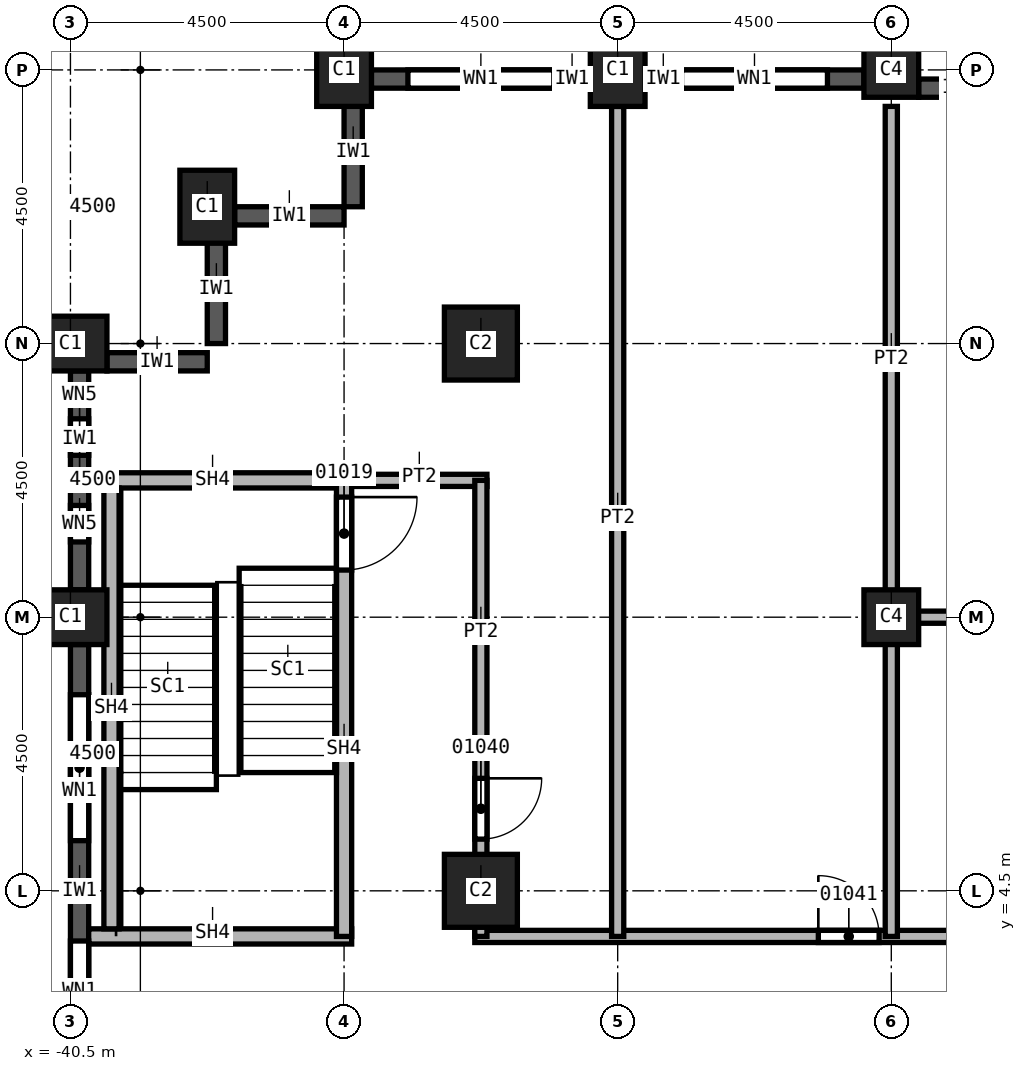
"""IFC4 building model, lengths in metres.
Left out: names, types, materials, properties, quantities, classifications, styles, units other than length and angle.
Written with IfcOpenShell. Run it as: python <this file> out.ifc"""

import sys

from ifc_helpers import new_model, si_unit, direction, frame, frame_2d, origin, origin_2d, place, context, subcontext, project, spatial, rectangle, extrude, element, fill, save


model = new_model("IFC4")
c1 = context("Model", 3, precision=1e-05, world=origin(), true_north=direction((0.0, 1.0)))
c2 = subcontext(c1, "Body", "Model", "MODEL_VIEW")
j1 = project(units=[si_unit("LENGTHUNIT", "METRE"), si_unit("PLANEANGLEUNIT", "RADIAN")], contexts=[c1])
p1 = place(None, origin())
s1 = spatial("IfcSite", under=j1, at=p1, CompositionType="ELEMENT")
p2 = place(p1, origin())
s2 = spatial("IfcBuilding", under=s1, at=p2, CompositionType="ELEMENT")
p3 = place(p2, frame((0.0, 0.0, 68.0)))
s3 = spatial("IfcBuildingStorey", under=s2, at=p3, CompositionType="ELEMENT", Elevation=68.0)
for number, where, z_axis, x_axis in (
    (1, (-40.5, 9.0, 0.0), (0.0, 0.0, 1.0), (0.0, 1.0, 0.0)),
    (2, (-40.5, 13.5, 0.0), (0.0, 0.0, 1.0), (0.0, 1.0, 0.0)),
    (3, (-38.25, 15.75, 0.0), (0.0, 0.0, 1.0), (1.0, 0.0, 0.0)),
    (4, (-31.5, 18.0, 0.0), (0.0, 0.0, 1.0), (1.0, 0.0, 0.0)),
    (5, (-36.0, 18.0, 0.0), (0.0, 0.0, 1.0), (1.0, 0.0, 0.0)),
):
    element("IfcColumn", number, at=place(p3, frame(where, z_axis=z_axis, x_axis=x_axis)), inside=s3, PredefinedType="COLUMN", context=c2, shape_type="SweptSolid", body=[
        extrude(rectangle(XDim=0.9, YDim=1.2, at=origin_2d()), origin(), (0.0, 0.0, 1.0), 3.7),
    ])
for number, where, z_axis, x_axis in (
    (6, (-33.75, 4.5, 0.0), (0.0, 0.0, 1.0), (1.0, 0.0, 0.0)),
    (7, (-33.75, 13.5, 0.0), (0.0, 0.0, 1.0), (1.0, 0.0, 0.0)),
):
    element("IfcColumn", number, at=place(p3, frame(where, z_axis=z_axis, x_axis=x_axis)), inside=s3, PredefinedType="COLUMN", context=c2, shape_type="SweptSolid", body=[
        extrude(rectangle(XDim=1.2, YDim=1.2, at=origin_2d()), origin(), (0.0, 0.0, 1.0), 3.7),
    ])
for number, where, z_axis, x_axis in (
    (8, (-27.0, 9.0, 0.0), (0.0, 0.0, 1.0), (1.0, 0.0, 0.0)),
    (9, (-27.0, 18.0, 0.0), (0.0, 0.0, 1.0), (1.0, 0.0, 0.0)),
):
    element("IfcColumn", number, at=place(p3, frame(where, z_axis=z_axis, x_axis=x_axis)), inside=s3, PredefinedType="COLUMN", context=c2, shape_type="SweptSolid", body=[
        extrude(rectangle(XDim=0.9, YDim=0.9, at=origin_2d()), origin(), (0.0, 0.0, 1.0), 3.7),
    ])
for number, where, z_axis, x_axis in (
    (10, (-35.85, 17.55, 0.0), (0.0, 0.0, 1.0), (0.0, -1.0, 0.0)),
    (11, (-37.8, 15.6, 0.0), (0.0, 0.0, 1.0), (1.0, 0.0, 0.0)),
    (12, (-38.1, 15.3, 0.0), (0.0, 0.0, 1.0), (0.0, -1.0, 0.0)),
):
    element("IfcWall", number, at=place(p3, frame(where, z_axis=z_axis, x_axis=x_axis)), inside=s3, PredefinedType="SOLIDWALL", context=c2, shape_type="SweptSolid", body=[
        extrude(rectangle(XDim=1.8, YDim=0.3, at=frame_2d((0.9, 0.0))), origin(), (0.0, 0.0, 1.0), 3.1),
    ])
p4 = place(p3, frame((-39.9, 13.2, 0.0), z_axis=(0.0, 0.0, 1.0), x_axis=(1.0, 0.0, 0.0)))
e13 = element("IfcWall", 13, at=p4, inside=s3, PredefinedType="SOLIDWALL", context=c2, shape_type="SweptSolid", body=[
    extrude(rectangle(XDim=1.65, YDim=0.3, at=frame_2d((0.825, 0.0))), origin(), (0.0, 0.0, 1.0), 3.1),
])
p5 = place(p3, frame((-25.2, 17.7, 0.0), z_axis=(0.0, 0.0, 1.0), x_axis=(-1.0, 0.0, 0.0)))
e14 = element("IfcWall", 14, at=p5, inside=s3, PredefinedType="SOLIDWALL", context=c2, shape_type="SweptSolid", body=[
    extrude(rectangle(XDim=1.35, YDim=0.3, at=frame_2d((0.675, 0.0))), origin(), (0.0, 0.0, 1.0), 3.1),
])
p6 = place(p3, frame((-27.45, 17.85, 0.0), z_axis=(0.0, 0.0, 1.0), x_axis=(-1.0, 0.0, 0.0)))
e15 = element("IfcWall", 15, at=p6, inside=s3, PredefinedType="SOLIDWALL", context=c2, shape_type="SweptSolid", body=[
    extrude(rectangle(XDim=3.6, YDim=0.3, at=frame_2d((1.8, 0.0))), origin(), (0.0, 0.0, 1.0), 3.1),
])
p7 = place(p6, frame((0.6, 0.0, 0.8)))
e16 = element("IfcOpeningElement", 16, at=p7, cuts=e15, PredefinedType="OPENING", context=c2, shape_type="SweptSolid", body=[
    extrude(rectangle(XDim=2.4, YDim=1.95, at=frame_2d((1.2, 0.975))), frame((0.0, 0.15, 0.0), z_axis=(0.0, -1.0, 0.0), x_axis=(1.0, 0.0, 0.0)), (0.0, 0.0, 1.0), 0.3),
])
p8 = place(p3, frame((-31.95, 17.85, 0.0), z_axis=(0.0, 0.0, 1.0), x_axis=(-1.0, 0.0, 0.0)))
e17 = element("IfcWall", 17, at=p8, inside=s3, PredefinedType="SOLIDWALL", context=c2, shape_type="SweptSolid", body=[
    extrude(rectangle(XDim=3.6, YDim=0.3, at=frame_2d((1.8, 0.0))), origin(), (0.0, 0.0, 1.0), 3.1),
])
p9 = place(p8, frame((0.6, 0.0, 0.8)))
e18 = element("IfcOpeningElement", 18, at=p9, cuts=e17, PredefinedType="OPENING", context=c2, shape_type="SweptSolid", body=[
    extrude(rectangle(XDim=2.4, YDim=1.95, at=frame_2d((1.2, 0.975))), frame((0.0, 0.15, 0.0), z_axis=(0.0, -1.0, 0.0), x_axis=(1.0, 0.0, 0.0)), (0.0, 0.0, 1.0), 0.3),
])
p10 = place(p3, frame((-40.35, 13.05, 0.0), z_axis=(0.0, 0.0, 1.0), x_axis=(0.0, -1.0, 0.0)))
e19 = element("IfcWall", 19, at=p10, inside=s3, PredefinedType="SOLIDWALL", context=c2, shape_type="SweptSolid", body=[
    extrude(rectangle(XDim=3.6, YDim=0.3, at=frame_2d((1.8, 0.0))), origin(), (0.0, 0.0, 1.0), 3.1),
])
p11 = place(p10, frame((0.788, 0.0, 0.8)))
e20 = element("IfcOpeningElement", 20, at=p11, cuts=e19, PredefinedType="OPENING", context=c2, shape_type="SweptSolid", body=[
    extrude(rectangle(XDim=0.6, YDim=1.95, at=frame_2d((0.3, 0.975))), frame((0.0, 0.15, 0.0), z_axis=(0.0, -1.0, 0.0), x_axis=(1.0, 0.0, 0.0)), (0.0, 0.0, 1.0), 0.3),
])
p12 = place(p10, frame((2.212, 0.0, 0.8)))
e21 = element("IfcOpeningElement", 21, at=p12, cuts=e19, PredefinedType="OPENING", context=c2, shape_type="SweptSolid", body=[
    extrude(rectangle(XDim=0.6, YDim=1.95, at=frame_2d((0.3, 0.975))), frame((0.0, 0.15, 0.0), z_axis=(0.0, -1.0, 0.0), x_axis=(1.0, 0.0, 0.0)), (0.0, 0.0, 1.0), 0.3),
])
p13 = place(p3, frame((-40.35, 8.55, 0.0), z_axis=(0.0, 0.0, 1.0), x_axis=(0.0, -1.0, 0.0)))
e22 = element("IfcWall", 22, at=p13, inside=s3, PredefinedType="SOLIDWALL", context=c2, shape_type="SweptSolid", body=[
    extrude(rectangle(XDim=8.1, YDim=0.3, at=frame_2d((4.05, 0.0))), origin(), (0.0, 0.0, 1.0), 3.1),
])
p14 = place(p13, frame((0.825, 0.0, 0.8)))
e23 = element("IfcOpeningElement", 23, at=p14, cuts=e22, PredefinedType="OPENING", context=c2, shape_type="SweptSolid", body=[
    extrude(rectangle(XDim=2.4, YDim=1.95, at=frame_2d((1.2, 0.975))), frame((0.0, 0.15, 0.0), z_axis=(0.0, -1.0, 0.0), x_axis=(1.0, 0.0, 0.0)), (0.0, 0.0, 1.0), 0.3),
])
p15 = place(p13, frame((4.875, 0.0, 0.8)))
e24 = element("IfcOpeningElement", 24, at=p15, cuts=e22, PredefinedType="OPENING", context=c2, shape_type="SweptSolid", body=[
    extrude(rectangle(XDim=2.4, YDim=1.95, at=frame_2d((1.2, 0.975))), frame((0.0, 0.15, 0.0), z_axis=(0.0, -1.0, 0.0), x_axis=(1.0, 0.0, 0.0)), (0.0, 0.0, 1.0), 0.3),
])
p16 = place(p3, frame((-36.0, 11.25, 0.0), z_axis=(0.0, 0.0, 1.0), x_axis=(1.0, 0.0, 0.0)))
e25 = element("IfcWall", 25, at=p16, inside=s3, PredefinedType="PARTITIONING", context=c2, shape_type="SweptSolid", body=[
    extrude(rectangle(XDim=2.35, YDim=0.2, at=frame_2d((1.175, 0.0))), origin(), (0.0, 0.0, 1.0), 3.7),
])
p17 = place(p3, frame((-33.85, 3.75, 0.0), z_axis=(0.0, 0.0, 1.0), x_axis=(1.0, 0.0, 0.0)))
e26 = element("IfcWall", 26, at=p17, inside=s3, PredefinedType="PARTITIONING", context=c2, shape_type="SweptSolid", body=[
    extrude(rectangle(XDim=18.45, YDim=0.2, at=frame_2d((9.225, 0.0))), origin(), (0.0, 0.0, 1.0), 3.7),
])
p18 = place(p17, frame((13.9, 0.0, 0.0)))
e27 = element("IfcOpeningElement", 27, at=p18, cuts=e26, PredefinedType="OPENING", context=c2, shape_type="SweptSolid", body=[
    extrude(rectangle(XDim=1.0, YDim=2.1, at=frame_2d((0.5, 1.05))), frame((0.0, 0.1, 0.0), z_axis=(0.0, -1.0, 0.0), x_axis=(1.0, 0.0, 0.0)), (0.0, 0.0, 1.0), 0.2),
])
p19 = place(p17, frame((5.65, 0.0, 0.0)))
e28 = element("IfcOpeningElement", 28, at=p19, cuts=e26, PredefinedType="OPENING", context=c2, shape_type="SweptSolid", body=[
    extrude(rectangle(XDim=1.0, YDim=2.1, at=frame_2d((0.5, 1.05))), frame((0.0, 0.1, 0.0), z_axis=(0.0, -1.0, 0.0), x_axis=(1.0, 0.0, 0.0)), (0.0, 0.0, 1.0), 0.2),
])
p20 = place(p3, frame((-33.75, 11.25, 0.0), z_axis=(0.0, 0.0, 1.0), x_axis=(0.0, -1.0, 0.0)))
e29 = element("IfcWall", 29, at=p20, inside=s3, PredefinedType="PARTITIONING", context=c2, shape_type="SweptSolid", body=[
    extrude(rectangle(XDim=7.5, YDim=0.2, at=frame_2d((3.75, 0.0))), origin(), (0.0, 0.0, 1.0), 3.7),
])
p21 = place(p20, frame((4.9, 0.0, 0.0)))
e30 = element("IfcOpeningElement", 30, at=p21, cuts=e29, PredefinedType="OPENING", context=c2, shape_type="SweptSolid", body=[
    extrude(rectangle(XDim=1.0, YDim=2.1, at=frame_2d((0.5, 1.05))), frame((0.0, 0.1, 0.0), z_axis=(0.0, -1.0, 0.0), x_axis=(1.0, 0.0, 0.0)), (0.0, 0.0, 1.0), 0.2),
])
p22 = place(p3, frame((-31.5, 17.4, 0.0), z_axis=(0.0, 0.0, 1.0), x_axis=(0.0, -1.0, 0.0)))
e31 = element("IfcWall", 31, at=p22, inside=s3, PredefinedType="PARTITIONING", context=c2, shape_type="SweptSolid", body=[
    extrude(rectangle(XDim=13.65, YDim=0.2, at=frame_2d((6.825, 0.0))), origin(), (0.0, 0.0, 1.0), 3.7),
])
p23 = place(p3, frame((-27.1, 9.0, 0.0), z_axis=(0.0, 0.0, 1.0), x_axis=(1.0, 0.0, 0.0)))
e32 = element("IfcWall", 32, at=p23, inside=s3, PredefinedType="PARTITIONING", context=c2, shape_type="SweptSolid", body=[
    extrude(rectangle(XDim=11.7, YDim=0.2, at=frame_2d((5.85, 0.0))), origin(), (0.0, 0.0, 1.0), 3.7),
])
p24 = place(p3, frame((-27.0, 3.75, 0.0), z_axis=(0.0, 0.0, 1.0), x_axis=(0.0, 1.0, 0.0)))
e33 = element("IfcWall", 33, at=p24, inside=s3, PredefinedType="PARTITIONING", context=c2, shape_type="SweptSolid", body=[
    extrude(rectangle(XDim=13.65, YDim=0.2, at=frame_2d((6.825, 0.0))), origin(), (0.0, 0.0, 1.0), 3.7),
])
p25 = place(p3, frame((-40.2, 3.75, 0.0), z_axis=(0.0, 0.0, 1.0), x_axis=(1.0, 0.0, 0.0)))
e34 = element("IfcWall", 34, at=p25, inside=s3, PredefinedType="SOLIDWALL", context=c2, shape_type="SweptSolid", body=[
    extrude(rectangle(XDim=4.325, YDim=0.25, at=frame_2d((2.163, 0.0))), origin(), (0.0, 0.0, 1.0), 3.7),
])
p26 = place(p3, frame((-40.2, 11.25, 0.0), z_axis=(0.0, 0.0, 1.0), x_axis=(1.0, 0.0, 0.0)))
e35 = element("IfcWall", 35, at=p26, inside=s3, PredefinedType="SOLIDWALL", context=c2, shape_type="SweptSolid", body=[
    extrude(rectangle(XDim=4.2, YDim=0.25, at=frame_2d((2.1, 0.0))), origin(), (0.0, 0.0, 1.0), 3.7),
])
p27 = place(p3, frame((-36.0, 11.375, 0.0), z_axis=(0.0, 0.0, 1.0), x_axis=(0.0, -1.0, 0.0)))
e36 = element("IfcWall", 36, at=p27, inside=s3, PredefinedType="SOLIDWALL", context=c2, shape_type="SweptSolid", body=[
    extrude(rectangle(XDim=7.625, YDim=0.25, at=frame_2d((3.812, 0.0))), origin(), (0.0, 0.0, 1.0), 3.7),
])
p28 = place(p27, frame((0.4, 0.0, 0.0)))
e37 = element("IfcOpeningElement", 37, at=p28, cuts=e36, PredefinedType="OPENING", context=c2, shape_type="SweptSolid", body=[
    extrude(rectangle(XDim=1.2, YDim=2.1, at=frame_2d((0.6, 1.05))), frame((0.0, 0.125, 0.0), z_axis=(0.0, -1.0, 0.0), x_axis=(1.0, 0.0, 0.0)), (0.0, 0.0, 1.0), 0.25),
])
p29 = place(p3, frame((-39.825, 3.875, 0.0), z_axis=(0.0, 0.0, 1.0), x_axis=(0.0, 1.0, 0.0)))
e38 = element("IfcWall", 38, at=p29, inside=s3, PredefinedType="SOLIDWALL", context=c2, shape_type="SweptSolid", body=[
    extrude(rectangle(XDim=7.25, YDim=0.25, at=frame_2d((3.625, 0.0))), origin(), (0.0, 0.0, 1.0), 3.7),
])
p30 = place(p7, origin())
e39 = element("IfcWindow", 39, at=p30, inside=s3, PartitioningType="SINGLE_PANEL", PredefinedType="WINDOW", context=c2, shape_type="SweptSolid", body=[
    extrude(rectangle(XDim=2.4, YDim=1.95, at=frame_2d((1.2, 0.975))), frame((0.0, 0.03, 0.0), z_axis=(0.0, -1.0, 0.0), x_axis=(1.0, 0.0, 0.0)), (0.0, 0.0, 1.0), 0.06),
])
fill(e16, e39)
p31 = place(p9, origin())
e40 = element("IfcWindow", 40, at=p31, inside=s3, PartitioningType="SINGLE_PANEL", PredefinedType="WINDOW", context=c2, shape_type="SweptSolid", body=[
    extrude(rectangle(XDim=2.4, YDim=1.95, at=frame_2d((1.2, 0.975))), frame((0.0, 0.03, 0.0), z_axis=(0.0, -1.0, 0.0), x_axis=(1.0, 0.0, 0.0)), (0.0, 0.0, 1.0), 0.06),
])
fill(e18, e40)
p32 = place(p14, origin())
e41 = element("IfcWindow", 41, at=p32, inside=s3, PartitioningType="SINGLE_PANEL", PredefinedType="WINDOW", context=c2, shape_type="SweptSolid", body=[
    extrude(rectangle(XDim=2.4, YDim=1.95, at=frame_2d((1.2, 0.975))), frame((0.0, 0.03, 0.0), z_axis=(0.0, -1.0, 0.0), x_axis=(1.0, 0.0, 0.0)), (0.0, 0.0, 1.0), 0.06),
])
fill(e23, e41)
p33 = place(p15, origin())
e42 = element("IfcWindow", 42, at=p33, inside=s3, PartitioningType="SINGLE_PANEL", PredefinedType="WINDOW", context=c2, shape_type="SweptSolid", body=[
    extrude(rectangle(XDim=2.4, YDim=1.95, at=frame_2d((1.2, 0.975))), frame((0.0, 0.03, 0.0), z_axis=(0.0, -1.0, 0.0), x_axis=(1.0, 0.0, 0.0)), (0.0, 0.0, 1.0), 0.06),
])
fill(e24, e42)
p34 = place(p28, origin())
e43 = element("IfcDoor", 43, at=p34, inside=s3, OperationType="SINGLE_SWING_RIGHT", PredefinedType="DOOR", context=c2, shape_type="SweptSolid", body=[
    extrude(rectangle(XDim=1.2, YDim=2.1, at=frame_2d((0.6, 1.05))), frame((0.0, 0.025, 0.0), z_axis=(0.0, -1.0, 0.0), x_axis=(1.0, 0.0, 0.0)), (0.0, 0.0, 1.0), 0.05),
])
fill(e37, e43)
p35 = place(p21, origin())
e44 = element("IfcDoor", 44, at=p35, inside=s3, OperationType="SINGLE_SWING_LEFT", PredefinedType="DOOR", context=c2, shape_type="SweptSolid", body=[
    extrude(rectangle(XDim=1.0, YDim=2.1, at=frame_2d((0.5, 1.05))), frame((0.0, 0.025, 0.0), z_axis=(0.0, -1.0, 0.0), x_axis=(1.0, 0.0, 0.0)), (0.0, 0.0, 1.0), 0.05),
])
fill(e30, e44)
p36 = place(p19, origin())
e45 = element("IfcDoor", 45, at=p36, inside=s3, OperationType="SINGLE_SWING_RIGHT", PredefinedType="DOOR", context=c2, shape_type="SweptSolid", body=[
    extrude(rectangle(XDim=1.0, YDim=2.1, at=frame_2d((0.5, 1.05))), frame((0.0, 0.025, 0.0), z_axis=(0.0, -1.0, 0.0), x_axis=(1.0, 0.0, 0.0)), (0.0, 0.0, 1.0), 0.05),
])
fill(e28, e45)
p37 = place(p11, origin())
e46 = element("IfcWindow", 46, at=p37, inside=s3, PartitioningType="SINGLE_PANEL", PredefinedType="WINDOW", context=c2, shape_type="SweptSolid", body=[
    extrude(rectangle(XDim=0.6, YDim=1.95, at=frame_2d((0.3, 0.975))), frame((0.0, 0.03, 0.0), z_axis=(0.0, -1.0, 0.0), x_axis=(1.0, 0.0, 0.0)), (0.0, 0.0, 1.0), 0.06),
])
fill(e20, e46)
p38 = place(p12, origin())
e47 = element("IfcWindow", 47, at=p38, inside=s3, PartitioningType="SINGLE_PANEL", PredefinedType="WINDOW", context=c2, shape_type="SweptSolid", body=[
    extrude(rectangle(XDim=0.6, YDim=1.95, at=frame_2d((0.3, 0.975))), frame((0.0, 0.03, 0.0), z_axis=(0.0, -1.0, 0.0), x_axis=(1.0, 0.0, 0.0)), (0.0, 0.0, 1.0), 0.06),
])
fill(e21, e47)
save(model, sys.argv[1])
